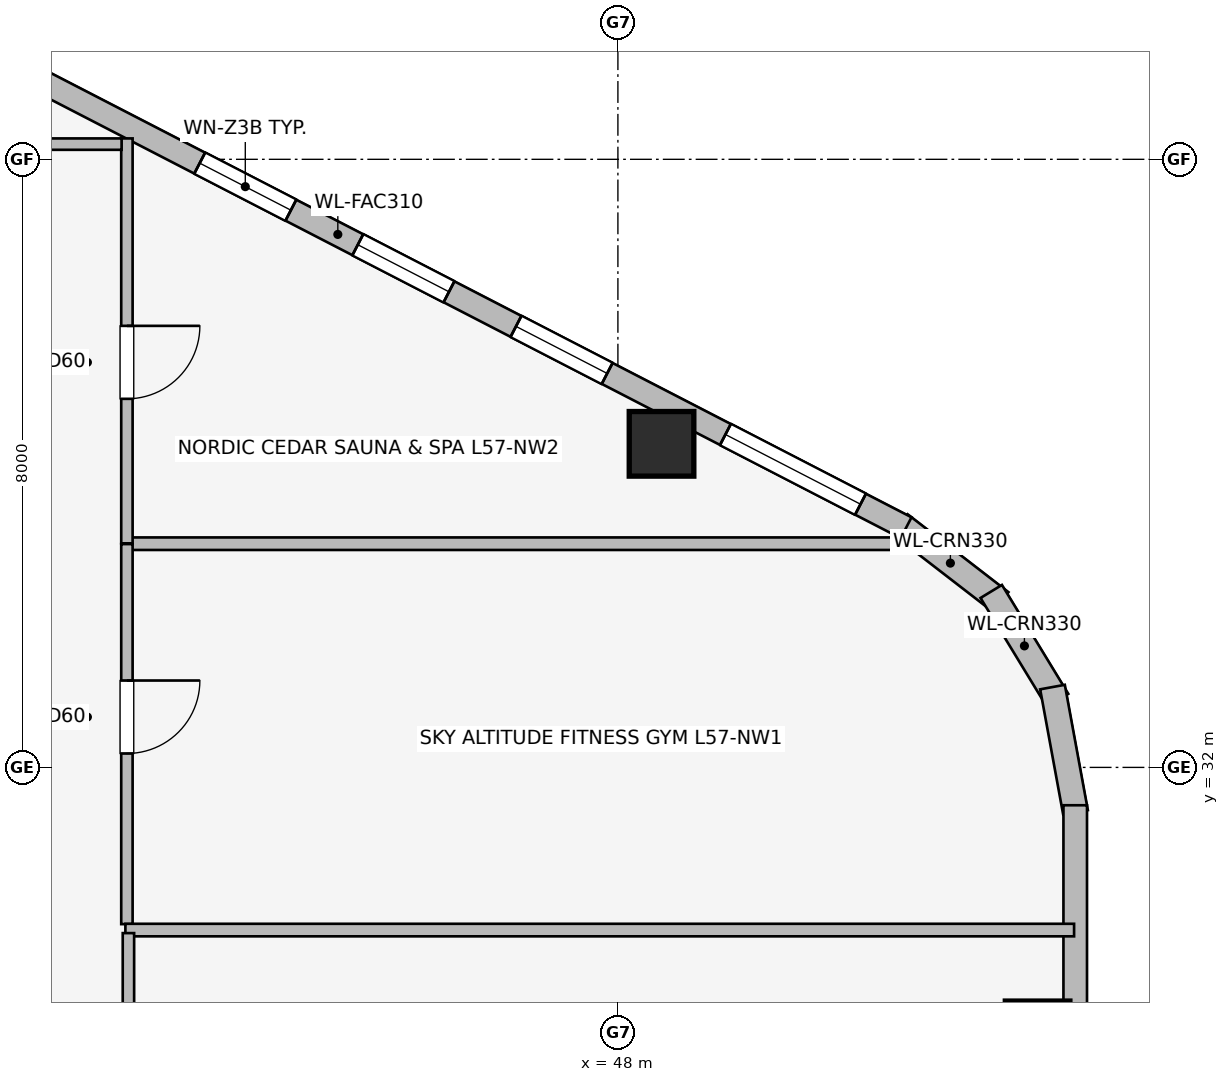
"""IFC4 building model, lengths in metres.
Left out: names, types, materials, properties, quantities, classifications, styles, units other than length and angle.
Written with IfcOpenShell. Run it as: python <this file> out.ifc"""

import sys

from ifc_helpers import new_model, si_unit, direction, frame, frame_2d, origin, origin_2d, place, context, subcontext, project, spatial, rectangle, extrude, element, fill, save


model = new_model("IFC4")
c1 = context("Model", 3, precision=1e-05, world=origin(), true_north=direction((0.0, 1.0)))
c2 = subcontext(c1, "Body", "Model", "MODEL_VIEW")
j1 = project(units=[si_unit("LENGTHUNIT", "METRE"), si_unit("PLANEANGLEUNIT", "RADIAN")], contexts=[c1])
p1 = place(None, origin())
s1 = spatial("IfcSite", under=j1, at=p1, CompositionType="ELEMENT")
p2 = place(p1, origin())
s2 = spatial("IfcBuilding", under=s1, at=p2, CompositionType="ELEMENT")
p3 = place(p2, frame((0.0, 0.0, 210.25)))
s3 = spatial("IfcBuildingStorey", under=s2, at=p3, CompositionType="ELEMENT", Elevation=210.25)
for number, where, z_axis, x_axis in (
    (1, (48.574, 36.257, 0.0), (0.0, 0.0, 1.0), (1.0, 0.0, 0.0)),
    (2, (53.522, 28.501, 0.0), (0.0, 0.0, 1.0), (1.0, 0.0, 0.0)),
):
    element("IfcColumn", number, at=place(p3, frame(where, z_axis=z_axis, x_axis=x_axis)), inside=s3, PredefinedType="COLUMN", context=c2, shape_type="SweptSolid", body=[
        extrude(rectangle(XDim=0.85, YDim=0.85, at=origin_2d()), origin(), (0.0, 0.0, 1.0), 3.45),
    ])
p4 = place(p3, frame((51.711, 35.2, 0.0), z_axis=(0.0, 0.0, 1.0), x_axis=(0.791464279355, -0.611215423976, 0.0)))
e3 = element("IfcWall", 3, at=p4, inside=s3, PredefinedType="STANDARD", context=c2, shape_type="SweptSolid", body=[
    extrude(rectangle(XDim=1.677, YDim=0.33, at=frame_2d((0.838, 0.0))), origin(), (0.0, 0.0, 1.0), 3.19),
])
p5 = place(p3, frame((52.912, 34.315, 0.0), z_axis=(0.0, 0.0, 1.0), x_axis=(0.520219286058, -0.85403272444, 0.0)))
e4 = element("IfcWall", 4, at=p5, inside=s3, PredefinedType="STANDARD", context=c2, shape_type="SweptSolid", body=[
    extrude(rectangle(XDim=1.678, YDim=0.33, at=frame_2d((0.839, 0.0))), origin(), (0.0, 0.0, 1.0), 3.19),
])
p6 = place(p3, frame((53.718, 33.057, 0.0), z_axis=(0.0, 0.0, 1.0), x_axis=(0.180717642671, -0.983535019014, 0.0)))
e5 = element("IfcWall", 5, at=p6, inside=s3, PredefinedType="STANDARD", context=c2, shape_type="SweptSolid", body=[
    extrude(rectangle(XDim=1.677, YDim=0.33, at=frame_2d((0.838, 0.0))), origin(), (0.0, 0.0, 1.0), 3.19),
])
p7 = place(p3, frame((36.838, 42.871, 0.0), z_axis=(0.0, 0.0, 1.0), x_axis=(0.888626188278, -0.458632202867, 0.0)))
e6 = element("IfcWall", 6, at=p7, inside=s3, PredefinedType="STANDARD", context=c2, shape_type="SweptSolid", body=[
    extrude(rectangle(XDim=16.828, YDim=0.31, at=frame_2d((8.414, 0.0))), origin(), (0.0, 0.0, 1.0), 3.19),
])
p8 = place(p7, frame((0.675, 0.0, 0.75)))
e7 = element("IfcOpeningElement", 7, at=p8, cuts=e6, PredefinedType="OPENING", context=c2, shape_type="SweptSolid", body=[
    extrude(rectangle(XDim=2.0, YDim=1.5, at=frame_2d((1.0, 0.75))), frame((0.0, 0.165, 0.0), z_axis=(0.0, -1.0, 0.0), x_axis=(1.0, 0.0, 0.0)), (0.0, 0.0, 1.0), 0.33),
])
p9 = place(p7, frame((6.369, 0.0, 0.75)))
e8 = element("IfcOpeningElement", 8, at=p9, cuts=e6, PredefinedType="OPENING", context=c2, shape_type="SweptSolid", body=[
    extrude(rectangle(XDim=1.35, YDim=1.45, at=frame_2d((0.675, 0.725))), frame((0.0, 0.165, 0.0), z_axis=(0.0, -1.0, 0.0), x_axis=(1.0, 0.0, 0.0)), (0.0, 0.0, 1.0), 0.33),
])
p10 = place(p7, frame((8.71, 0.0, 0.75)))
e9 = element("IfcOpeningElement", 9, at=p10, cuts=e6, PredefinedType="OPENING", context=c2, shape_type="SweptSolid", body=[
    extrude(rectangle(XDim=1.35, YDim=1.45, at=frame_2d((0.675, 0.725))), frame((0.0, 0.165, 0.0), z_axis=(0.0, -1.0, 0.0), x_axis=(1.0, 0.0, 0.0)), (0.0, 0.0, 1.0), 0.33),
])
p11 = place(p7, frame((11.052, 0.0, 0.75)))
e10 = element("IfcOpeningElement", 10, at=p11, cuts=e6, PredefinedType="OPENING", context=c2, shape_type="SweptSolid", body=[
    extrude(rectangle(XDim=1.35, YDim=1.45, at=frame_2d((0.675, 0.725))), frame((0.0, 0.165, 0.0), z_axis=(0.0, -1.0, 0.0), x_axis=(1.0, 0.0, 0.0)), (0.0, 0.0, 1.0), 0.33),
])
p12 = place(p7, frame((14.153, 0.0, 0.75)))
e11 = element("IfcOpeningElement", 11, at=p12, cuts=e6, PredefinedType="OPENING", context=c2, shape_type="SweptSolid", body=[
    extrude(rectangle(XDim=2.0, YDim=1.5, at=frame_2d((1.0, 0.75))), frame((0.0, 0.165, 0.0), z_axis=(0.0, -1.0, 0.0), x_axis=(1.0, 0.0, 0.0)), (0.0, 0.0, 1.0), 0.33),
])
p13 = place(p3, frame((54.017, 31.502, 0.0), z_axis=(0.0, 0.0, 1.0), x_axis=(0.0, -1.0, 0.0)))
e12 = element("IfcWall", 12, at=p13, inside=s3, PredefinedType="STANDARD", context=c2, shape_type="SweptSolid", body=[
    extrude(rectangle(XDim=15.004, YDim=0.31, at=frame_2d((7.502, 0.0))), origin(), (0.0, 0.0, 1.0), 3.19),
])
p14 = place(p13, frame((4.469, 0.0, 0.75)))
e13 = element("IfcOpeningElement", 13, at=p14, cuts=e12, PredefinedType="OPENING", context=c2, shape_type="SweptSolid", body=[
    extrude(rectangle(XDim=2.0, YDim=1.5, at=frame_2d((1.0, 0.75))), frame((0.0, 0.165, 0.0), z_axis=(0.0, -1.0, 0.0), x_axis=(1.0, 0.0, 0.0)), (0.0, 0.0, 1.0), 0.33),
])
p15 = place(p13, frame((9.093, 0.0, 0.75)))
e14 = element("IfcOpeningElement", 14, at=p15, cuts=e12, PredefinedType="OPENING", context=c2, shape_type="SweptSolid", body=[
    extrude(rectangle(XDim=1.35, YDim=1.45, at=frame_2d((0.675, 0.725))), frame((0.0, 0.165, 0.0), z_axis=(0.0, -1.0, 0.0), x_axis=(1.0, 0.0, 0.0)), (0.0, 0.0, 1.0), 0.33),
])
p16 = place(p3, frame((41.55, 34.943, 0.0), z_axis=(0.0, 0.0, 1.0), x_axis=(1.0, 0.0, 0.0)))
e15 = element("IfcWall", 15, at=p16, inside=s3, PredefinedType="PARTITIONING", context=c2, shape_type="SweptSolid", body=[
    extrude(rectangle(XDim=10.485, YDim=0.165, at=frame_2d((5.242, 0.0))), origin(), (0.0, 0.0, 1.0), 3.19),
])
p17 = place(p3, frame((41.54, 34.938, 0.0), z_axis=(0.0, 0.0, 1.0), x_axis=(0.0, -1.0, 0.0)))
e16 = element("IfcWall", 16, at=p17, inside=s3, PredefinedType="PARTITIONING", context=c2, shape_type="SweptSolid", body=[
    extrude(rectangle(XDim=5.0, YDim=0.15, at=frame_2d((2.5, 0.0))), origin(), (0.0, 0.0, 1.0), 3.19),
])
p18 = place(p17, frame((1.795, 0.0, 0.0)))
e17 = element("IfcOpeningElement", 17, at=p18, cuts=e16, PredefinedType="OPENING", context=c2, shape_type="SweptSolid", body=[
    extrude(rectangle(XDim=0.96, YDim=2.0, at=frame_2d((0.48, 1.0))), frame((0.0, 0.085, 0.0), z_axis=(0.0, -1.0, 0.0), x_axis=(1.0, 0.0, 0.0)), (0.0, 0.0, 1.0), 0.17),
])
p19 = place(p3, frame((41.54, 40.275, 0.0), z_axis=(0.0, 0.0, 1.0), x_axis=(0.0, -1.0, 0.0)))
e18 = element("IfcWall", 18, at=p19, inside=s3, PredefinedType="PARTITIONING", context=c2, shape_type="SweptSolid", body=[
    extrude(rectangle(XDim=5.327, YDim=0.15, at=frame_2d((2.664, 0.0))), origin(), (0.0, 0.0, 1.0), 3.19),
])
p20 = place(p19, frame((2.466, 0.0, 0.0)))
e19 = element("IfcOpeningElement", 19, at=p20, cuts=e18, PredefinedType="OPENING", context=c2, shape_type="SweptSolid", body=[
    extrude(rectangle(XDim=0.96, YDim=2.0, at=frame_2d((0.48, 1.0))), frame((0.0, 0.085, 0.0), z_axis=(0.0, -1.0, 0.0), x_axis=(1.0, 0.0, 0.0)), (0.0, 0.0, 1.0), 0.17),
])
p21 = place(p3, frame((41.52, 29.86, 0.0), z_axis=(0.0, 0.0, 1.0), x_axis=(1.0, 0.0, 0.0)))
e20 = element("IfcWall", 20, at=p21, inside=s3, PredefinedType="PARTITIONING", context=c2, shape_type="SweptSolid", body=[
    extrude(rectangle(XDim=12.482, YDim=0.165, at=frame_2d((6.241, 0.0))), origin(), (0.0, 0.0, 1.0), 3.19),
])
p22 = place(p3, frame((41.56, 23.785, 0.0), z_axis=(0.0, 0.0, 1.0), x_axis=(0.0, 1.0, 0.0)))
e21 = element("IfcWall", 21, at=p22, inside=s3, PredefinedType="PARTITIONING", context=c2, shape_type="SweptSolid", body=[
    extrude(rectangle(XDim=6.035, YDim=0.15, at=frame_2d((3.018, 0.0))), origin(), (0.0, 0.0, 1.0), 3.19),
])
p23 = place(p22, frame((2.538, 0.0, 0.0)))
e22 = element("IfcOpeningElement", 22, at=p23, cuts=e21, PredefinedType="OPENING", context=c2, shape_type="SweptSolid", body=[
    extrude(rectangle(XDim=0.96, YDim=2.0, at=frame_2d((0.48, 1.0))), frame((0.0, 0.085, 0.0), z_axis=(0.0, -1.0, 0.0), x_axis=(1.0, 0.0, 0.0)), (0.0, 0.0, 1.0), 0.17),
])
p24 = place(p3, frame((39.958, 40.2, 0.0), z_axis=(0.0, 0.0, 1.0), x_axis=(1.0, 0.0, 0.0)))
e23 = element("IfcWall", 23, at=p24, inside=s3, PredefinedType="PARTITIONING", context=c2, shape_type="SweptSolid", body=[
    extrude(rectangle(XDim=1.512, YDim=0.15, at=frame_2d((0.756, 0.0))), origin(), (0.0, 0.0, 1.0), 3.19),
])
p25 = place(p9, origin())
e24 = element("IfcWindow", 24, at=p25, inside=s3, PartitioningType="SINGLE_PANEL", PredefinedType="WINDOW", context=c2, shape_type="SweptSolid", body=[
    extrude(rectangle(XDim=1.35, YDim=1.45, at=frame_2d((0.675, 0.725))), frame((0.0, 0.03, 0.0), z_axis=(0.0, -1.0, 0.0), x_axis=(1.0, 0.0, 0.0)), (0.0, 0.0, 1.0), 0.06),
])
fill(e8, e24)
p26 = place(p10, origin())
e25 = element("IfcWindow", 25, at=p26, inside=s3, PartitioningType="SINGLE_PANEL", PredefinedType="WINDOW", context=c2, shape_type="SweptSolid", body=[
    extrude(rectangle(XDim=1.35, YDim=1.45, at=frame_2d((0.675, 0.725))), frame((0.0, 0.03, 0.0), z_axis=(0.0, -1.0, 0.0), x_axis=(1.0, 0.0, 0.0)), (0.0, 0.0, 1.0), 0.06),
])
fill(e9, e25)
p27 = place(p11, origin())
e26 = element("IfcWindow", 26, at=p27, inside=s3, PartitioningType="SINGLE_PANEL", PredefinedType="WINDOW", context=c2, shape_type="SweptSolid", body=[
    extrude(rectangle(XDim=1.35, YDim=1.45, at=frame_2d((0.675, 0.725))), frame((0.0, 0.03, 0.0), z_axis=(0.0, -1.0, 0.0), x_axis=(1.0, 0.0, 0.0)), (0.0, 0.0, 1.0), 0.06),
])
fill(e10, e26)
p28 = place(p12, origin())
e27 = element("IfcWindow", 27, at=p28, inside=s3, PartitioningType="SINGLE_PANEL", PredefinedType="WINDOW", context=c2, shape_type="SweptSolid", body=[
    extrude(rectangle(XDim=2.0, YDim=1.5, at=frame_2d((1.0, 0.75))), frame((0.0, 0.03, 0.0), z_axis=(0.0, -1.0, 0.0), x_axis=(1.0, 0.0, 0.0)), (0.0, 0.0, 1.0), 0.06),
])
fill(e11, e27)
p29 = place(p18, origin())
e28 = element("IfcDoor", 28, at=p29, inside=s3, OperationType="SINGLE_SWING_LEFT", PredefinedType="DOOR", context=c2, shape_type="SweptSolid", body=[
    extrude(rectangle(XDim=0.96, YDim=2.0, at=frame_2d((0.48, 1.0))), frame((0.0, 0.025, 0.0), z_axis=(0.0, -1.0, 0.0), x_axis=(1.0, 0.0, 0.0)), (0.0, 0.0, 1.0), 0.05),
])
fill(e17, e28)
p30 = place(p20, origin())
e29 = element("IfcDoor", 29, at=p30, inside=s3, OperationType="SINGLE_SWING_LEFT", PredefinedType="DOOR", context=c2, shape_type="SweptSolid", body=[
    extrude(rectangle(XDim=0.96, YDim=2.0, at=frame_2d((0.48, 1.0))), frame((0.0, 0.025, 0.0), z_axis=(0.0, -1.0, 0.0), x_axis=(1.0, 0.0, 0.0)), (0.0, 0.0, 1.0), 0.05),
])
fill(e19, e29)
save(model, sys.argv[1])
